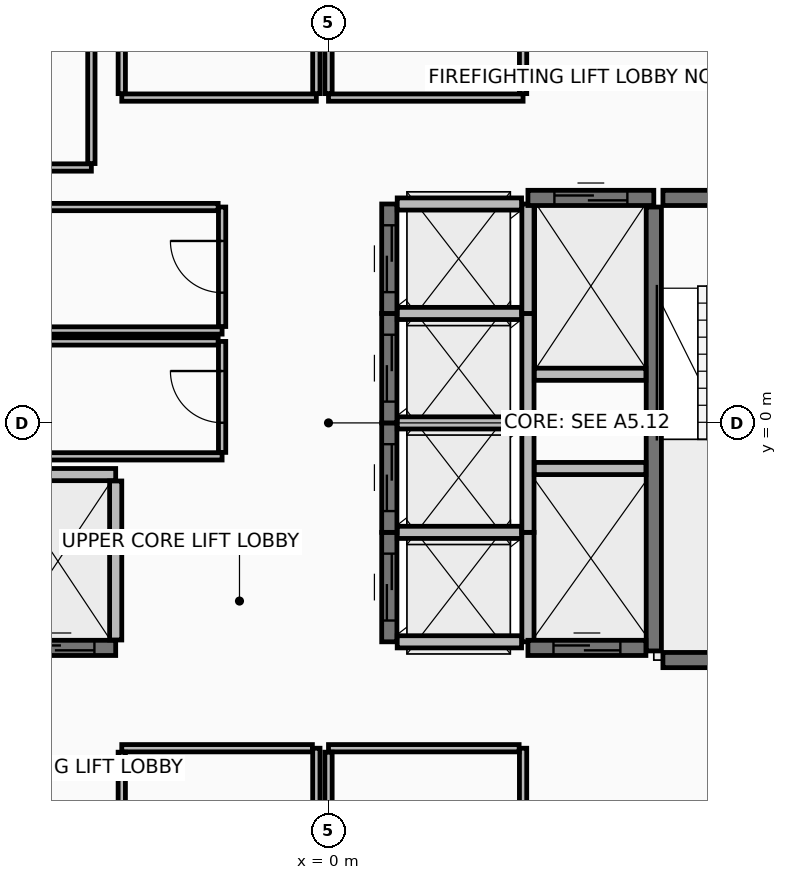
"""IFC4 building model, lengths in metres.
Left out: names, types, materials, properties, quantities, classifications, styles, units other than length and angle.
Written with IfcOpenShell. Run it as: python <this file> out.ifc"""

import sys

from ifc_helpers import new_model, si_unit, direction, frame, frame_2d, origin, place, context, subcontext, project, spatial, rectangle, extrude, element, fill, save


model = new_model("IFC4")
c1 = context("Model", 3, precision=1e-05, world=origin(), true_north=direction((0.0, 1.0)))
c2 = subcontext(c1, "Body", "Model", "MODEL_VIEW")
j1 = project(units=[si_unit("LENGTHUNIT", "METRE"), si_unit("PLANEANGLEUNIT", "RADIAN")], contexts=[c1])
p1 = place(None, origin())
s1 = spatial("IfcSite", under=j1, at=p1, CompositionType="ELEMENT")
p2 = place(p1, origin())
s2 = spatial("IfcBuilding", under=s1, at=p2, CompositionType="ELEMENT")
p3 = place(p2, frame((0.0, 0.0, 227.05)))
s3 = spatial("IfcBuildingStorey", under=s2, at=p3, CompositionType="ELEMENT", Elevation=227.05)
p4 = place(p3, frame((5.35, -3.75, 0.0), z_axis=(0.0, 0.0, 1.0), x_axis=(0.0, 1.0, 0.0)))
e1 = element("IfcWall", 1, at=p4, inside=s3, PredefinedType="SHEAR", context=c2, shape_type="SweptSolid", body=[
    extrude(rectangle(XDim=7.3, YDim=0.25, at=frame_2d((3.65, 0.0))), origin(), (0.0, 0.0, 1.0), 3.42),
])
p5 = place(p3, frame((5.5, 3.7, 0.0), z_axis=(0.0, 0.0, 1.0), x_axis=(1.0, 0.0, 0.0)))
e2 = element("IfcWall", 2, at=p5, inside=s3, PredefinedType="SHEAR", context=c2, shape_type="SweptSolid", body=[
    extrude(rectangle(XDim=3.0, YDim=0.25, at=frame_2d((1.5, 0.0))), origin(), (0.0, 0.0, 1.0), 3.42),
])
p6 = place(p5, frame((0.95, 0.0, 0.0)))
e3 = element("IfcOpeningElement", 3, at=p6, cuts=e2, PredefinedType="OPENING", context=c2, shape_type="SweptSolid", body=[
    extrude(rectangle(XDim=1.1, YDim=2.15, at=frame_2d((0.55, 1.075))), frame((0.0, 0.135, 0.0), z_axis=(0.0, -1.0, 0.0), x_axis=(1.0, 0.0, 0.0)), (0.0, 0.0, 1.0), 0.27),
])
p7 = place(p3, frame((5.5, -3.9, 0.0), z_axis=(0.0, 0.0, 1.0), x_axis=(1.0, 0.0, 0.0)))
e4 = element("IfcWall", 4, at=p7, inside=s3, PredefinedType="SHEAR", context=c2, shape_type="SweptSolid", body=[
    extrude(rectangle(XDim=3.0, YDim=0.25, at=frame_2d((1.5, 0.0))), origin(), (0.0, 0.0, 1.0), 3.42),
])
p8 = place(p3, frame((1.0, -3.6, 0.0), z_axis=(0.0, 0.0, 1.0), x_axis=(0.0, 1.0, 0.0)))
e5 = element("IfcWall", 5, at=p8, inside=s3, PredefinedType="SHEAR", context=c2, shape_type="SweptSolid", body=[
    extrude(rectangle(XDim=1.8, YDim=0.25, at=frame_2d((0.9, 0.0))), origin(), (0.0, 0.0, 1.0), 3.42),
])
p9 = place(p8, frame((0.35, 0.0, 0.0)))
e6 = element("IfcOpeningElement", 6, at=p9, cuts=e5, PredefinedType="OPENING", context=c2, shape_type="SweptSolid", body=[
    extrude(rectangle(XDim=1.1, YDim=2.2, at=frame_2d((0.55, 1.1))), frame((0.0, 0.135, 0.0), z_axis=(0.0, -1.0, 0.0), x_axis=(1.0, 0.0, 0.0)), (0.0, 0.0, 1.0), 0.27),
])
p10 = place(p3, frame((3.28, -3.6, 0.0), z_axis=(0.0, 0.0, 1.0), x_axis=(0.0, 1.0, 0.0)))
e7 = element("IfcWall", 7, at=p10, inside=s3, PredefinedType="PARTITIONING", context=c2, shape_type="SweptSolid", body=[
    extrude(rectangle(XDim=1.8, YDim=0.2, at=frame_2d((0.9, 0.0))), origin(), (0.0, 0.0, 1.0), 3.42),
])
for number, where, z_axis, x_axis in (
    (8, (1.13, -3.6, 0.0), (0.0, 0.0, 1.0), (1.0, 0.0, 0.0)),
    (9, (1.13, -1.8, 0.0), (0.0, 0.0, 1.0), (1.0, 0.0, 0.0)),
):
    element("IfcWall", number, at=place(p3, frame(where, z_axis=z_axis, x_axis=x_axis)), inside=s3, PredefinedType="PARTITIONING", context=c2, shape_type="SweptSolid", body=[
        extrude(rectangle(XDim=2.045, YDim=0.2, at=frame_2d((1.022, 0.0))), origin(), (0.0, 0.0, 1.0), 3.42),
    ])
p11 = place(p3, frame((1.0, -1.8, 0.0), z_axis=(0.0, 0.0, 1.0), x_axis=(0.0, 1.0, 0.0)))
e10 = element("IfcWall", 10, at=p11, inside=s3, PredefinedType="SHEAR", context=c2, shape_type="SweptSolid", body=[
    extrude(rectangle(XDim=1.8, YDim=0.25, at=frame_2d((0.9, 0.0))), origin(), (0.0, 0.0, 1.0), 3.42),
])
p12 = place(p11, frame((0.35, 0.0, 0.0)))
e11 = element("IfcOpeningElement", 11, at=p12, cuts=e10, PredefinedType="OPENING", context=c2, shape_type="SweptSolid", body=[
    extrude(rectangle(XDim=1.1, YDim=2.2, at=frame_2d((0.55, 1.1))), frame((0.0, 0.135, 0.0), z_axis=(0.0, -1.0, 0.0), x_axis=(1.0, 0.0, 0.0)), (0.0, 0.0, 1.0), 0.27),
])
p13 = place(p3, frame((3.28, -1.8, 0.0), z_axis=(0.0, 0.0, 1.0), x_axis=(0.0, 1.0, 0.0)))
e12 = element("IfcWall", 12, at=p13, inside=s3, PredefinedType="PARTITIONING", context=c2, shape_type="SweptSolid", body=[
    extrude(rectangle(XDim=1.8, YDim=0.2, at=frame_2d((0.9, 0.0))), origin(), (0.0, 0.0, 1.0), 3.42),
])
p14 = place(p3, frame((1.13, 0.0, 0.0), z_axis=(0.0, 0.0, 1.0), x_axis=(1.0, 0.0, 0.0)))
e13 = element("IfcWall", 13, at=p14, inside=s3, PredefinedType="PARTITIONING", context=c2, shape_type="SweptSolid", body=[
    extrude(rectangle(XDim=2.045, YDim=0.2, at=frame_2d((1.022, 0.0))), origin(), (0.0, 0.0, 1.0), 3.42),
])
p15 = place(p3, frame((1.0, 0.0, 0.0), z_axis=(0.0, 0.0, 1.0), x_axis=(0.0, 1.0, 0.0)))
e14 = element("IfcWall", 14, at=p15, inside=s3, PredefinedType="SHEAR", context=c2, shape_type="SweptSolid", body=[
    extrude(rectangle(XDim=1.8, YDim=0.25, at=frame_2d((0.9, 0.0))), origin(), (0.0, 0.0, 1.0), 3.42),
])
p16 = place(p15, frame((0.35, 0.0, 0.0)))
e15 = element("IfcOpeningElement", 15, at=p16, cuts=e14, PredefinedType="OPENING", context=c2, shape_type="SweptSolid", body=[
    extrude(rectangle(XDim=1.1, YDim=2.2, at=frame_2d((0.55, 1.1))), frame((0.0, 0.135, 0.0), z_axis=(0.0, -1.0, 0.0), x_axis=(1.0, 0.0, 0.0)), (0.0, 0.0, 1.0), 0.27),
])
p17 = place(p3, frame((3.28, 0.0, 0.0), z_axis=(0.0, 0.0, 1.0), x_axis=(0.0, 1.0, 0.0)))
e16 = element("IfcWall", 16, at=p17, inside=s3, PredefinedType="PARTITIONING", context=c2, shape_type="SweptSolid", body=[
    extrude(rectangle(XDim=1.8, YDim=0.2, at=frame_2d((0.9, 0.0))), origin(), (0.0, 0.0, 1.0), 3.42),
])
p18 = place(p3, frame((1.13, 1.8, 0.0), z_axis=(0.0, 0.0, 1.0), x_axis=(1.0, 0.0, 0.0)))
e17 = element("IfcWall", 17, at=p18, inside=s3, PredefinedType="PARTITIONING", context=c2, shape_type="SweptSolid", body=[
    extrude(rectangle(XDim=2.045, YDim=0.2, at=frame_2d((1.022, 0.0))), origin(), (0.0, 0.0, 1.0), 3.42),
])
p19 = place(p3, frame((1.0, 1.8, 0.0), z_axis=(0.0, 0.0, 1.0), x_axis=(0.0, 1.0, 0.0)))
e18 = element("IfcWall", 18, at=p19, inside=s3, PredefinedType="SHEAR", context=c2, shape_type="SweptSolid", body=[
    extrude(rectangle(XDim=1.8, YDim=0.25, at=frame_2d((0.9, 0.0))), origin(), (0.0, 0.0, 1.0), 3.42),
])
p20 = place(p19, frame((0.35, 0.0, 0.0)))
e19 = element("IfcOpeningElement", 19, at=p20, cuts=e18, PredefinedType="OPENING", context=c2, shape_type="SweptSolid", body=[
    extrude(rectangle(XDim=1.1, YDim=2.2, at=frame_2d((0.55, 1.1))), frame((0.0, 0.135, 0.0), z_axis=(0.0, -1.0, 0.0), x_axis=(1.0, 0.0, 0.0)), (0.0, 0.0, 1.0), 0.27),
])
p21 = place(p3, frame((3.28, 1.8, 0.0), z_axis=(0.0, 0.0, 1.0), x_axis=(0.0, 1.0, 0.0)))
e20 = element("IfcWall", 20, at=p21, inside=s3, PredefinedType="PARTITIONING", context=c2, shape_type="SweptSolid", body=[
    extrude(rectangle(XDim=1.8, YDim=0.2, at=frame_2d((0.9, 0.0))), origin(), (0.0, 0.0, 1.0), 3.42),
])
p22 = place(p3, frame((1.13, 3.6, 0.0), z_axis=(0.0, 0.0, 1.0), x_axis=(1.0, 0.0, 0.0)))
e21 = element("IfcWall", 21, at=p22, inside=s3, PredefinedType="PARTITIONING", context=c2, shape_type="SweptSolid", body=[
    extrude(rectangle(XDim=2.045, YDim=0.2, at=frame_2d((1.022, 0.0))), origin(), (0.0, 0.0, 1.0), 2.715),
])
p23 = place(p3, frame((-5.4, -3.7, 0.0), z_axis=(0.0, 0.0, 1.0), x_axis=(1.0, 0.0, 0.0)))
e22 = element("IfcWall", 22, at=p23, inside=s3, PredefinedType="SHEAR", context=c2, shape_type="SweptSolid", body=[
    extrude(rectangle(XDim=1.9, YDim=0.25, at=frame_2d((0.95, 0.0))), origin(), (0.0, 0.0, 1.0), 3.42),
])
p24 = place(p23, frame((0.35, 0.0, 0.0)))
e23 = element("IfcOpeningElement", 23, at=p24, cuts=e22, PredefinedType="OPENING", context=c2, shape_type="SweptSolid", body=[
    extrude(rectangle(XDim=1.2, YDim=2.2, at=frame_2d((0.6, 1.1))), frame((0.0, 0.135, 0.0), z_axis=(0.0, -1.0, 0.0), x_axis=(1.0, 0.0, 0.0)), (0.0, 0.0, 1.0), 0.27),
])
p25 = place(p3, frame((-5.27, -0.85, 0.0), z_axis=(0.0, 0.0, 1.0), x_axis=(1.0, 0.0, 0.0)))
e24 = element("IfcWall", 24, at=p25, inside=s3, PredefinedType="PARTITIONING", context=c2, shape_type="SweptSolid", body=[
    extrude(rectangle(XDim=1.77, YDim=0.2, at=frame_2d((0.885, 0.0))), origin(), (0.0, 0.0, 1.0), 3.42),
])
p26 = place(p3, frame((-3.5, -3.57, 0.0), z_axis=(0.0, 0.0, 1.0), x_axis=(0.0, 1.0, 0.0)))
e25 = element("IfcWall", 25, at=p26, inside=s3, PredefinedType="PARTITIONING", context=c2, shape_type="SweptSolid", body=[
    extrude(rectangle(XDim=2.615, YDim=0.2, at=frame_2d((1.308, 0.0))), origin(), (0.0, 0.0, 1.0), 3.42),
])
p27 = place(p3, frame((3.28, 3.7, 0.0), z_axis=(0.0, 0.0, 1.0), x_axis=(1.0, 0.0, 0.0)))
e26 = element("IfcWall", 26, at=p27, inside=s3, PredefinedType="SHEAR", context=c2, shape_type="SweptSolid", body=[
    extrude(rectangle(XDim=2.07, YDim=0.25, at=frame_2d((1.035, 0.0))), origin(), (0.0, 0.0, 1.0), 3.42),
])
p28 = place(p27, frame((0.435, 0.0, 0.0)))
e27 = element("IfcOpeningElement", 27, at=p28, cuts=e26, PredefinedType="OPENING", context=c2, shape_type="SweptSolid", body=[
    extrude(rectangle(XDim=1.2, YDim=2.2, at=frame_2d((0.6, 1.1))), frame((0.0, 0.135, 0.0), z_axis=(0.0, -1.0, 0.0), x_axis=(1.0, 0.0, 0.0)), (0.0, 0.0, 1.0), 0.27),
])
p29 = place(p3, frame((3.385, 0.8, 0.0), z_axis=(0.0, 0.0, 1.0), x_axis=(1.0, 0.0, 0.0)))
e28 = element("IfcWall", 28, at=p29, inside=s3, PredefinedType="PARTITIONING", context=c2, shape_type="SweptSolid", body=[
    extrude(rectangle(XDim=1.835, YDim=0.2, at=frame_2d((0.917, 0.0))), origin(), (0.0, 0.0, 1.0), 3.42),
])
p30 = place(p3, frame((3.28, -3.7, 0.0), z_axis=(0.0, 0.0, 1.0), x_axis=(1.0, 0.0, 0.0)))
e29 = element("IfcWall", 29, at=p30, inside=s3, PredefinedType="SHEAR", context=c2, shape_type="SweptSolid", body=[
    extrude(rectangle(XDim=1.94, YDim=0.25, at=frame_2d((0.97, 0.0))), origin(), (0.0, 0.0, 1.0), 3.42),
])
p31 = place(p30, frame((0.42, 0.0, 0.0)))
e30 = element("IfcOpeningElement", 30, at=p31, cuts=e29, PredefinedType="OPENING", context=c2, shape_type="SweptSolid", body=[
    extrude(rectangle(XDim=1.1, YDim=2.2, at=frame_2d((0.55, 1.1))), frame((0.0, 0.135, 0.0), z_axis=(0.0, -1.0, 0.0), x_axis=(1.0, 0.0, 0.0)), (0.0, 0.0, 1.0), 0.27),
])
p32 = place(p3, frame((3.385, -0.75, 0.0), z_axis=(0.0, 0.0, 1.0), x_axis=(1.0, 0.0, 0.0)))
e31 = element("IfcWall", 31, at=p32, inside=s3, PredefinedType="PARTITIONING", context=c2, shape_type="SweptSolid", body=[
    extrude(rectangle(XDim=1.835, YDim=0.2, at=frame_2d((0.917, 0.0))), origin(), (0.0, 0.0, 1.0), 3.42),
])
p33 = place(p3, frame((-5.22, 1.52, 0.0), z_axis=(0.0, 0.0, 1.0), x_axis=(1.0, 0.0, 0.0)))
e32 = element("IfcWall", 32, at=p33, inside=s3, PredefinedType="PARTITIONING", context=c2, shape_type="SweptSolid", body=[
    extrude(rectangle(XDim=3.47, YDim=0.12, at=frame_2d((1.735, 0.0))), origin(), (0.0, 0.0, 1.0), 3.42),
])
p34 = place(p3, frame((-1.75, 1.585, 0.0), z_axis=(0.0, 0.0, 1.0), x_axis=(0.0, 1.0, 0.0)))
e33 = element("IfcWall", 33, at=p34, inside=s3, PredefinedType="PARTITIONING", context=c2, shape_type="SweptSolid", body=[
    extrude(rectangle(XDim=1.965, YDim=0.12, at=frame_2d((0.982, 0.0))), origin(), (0.0, 0.0, 1.0), 3.42),
])
p35 = place(p34, frame((0.557, 0.0, 0.0)))
e34 = element("IfcOpeningElement", 34, at=p35, cuts=e33, PredefinedType="OPENING", context=c2, shape_type="SweptSolid", body=[
    extrude(rectangle(XDim=0.85, YDim=2.1, at=frame_2d((0.425, 1.05))), frame((0.0, 0.07, 0.0), z_axis=(0.0, -1.0, 0.0), x_axis=(1.0, 0.0, 0.0)), (0.0, 0.0, 1.0), 0.14),
])
p36 = place(p3, frame((-1.815, 3.55, 0.0), z_axis=(0.0, 0.0, 1.0), x_axis=(-1.0, 0.0, 0.0)))
e35 = element("IfcWall", 35, at=p36, inside=s3, PredefinedType="PARTITIONING", context=c2, shape_type="SweptSolid", body=[
    extrude(rectangle(XDim=3.405, YDim=0.12, at=frame_2d((1.703, 0.0))), origin(), (0.0, 0.0, 1.0), 3.42),
])
p37 = place(p3, frame((-5.22, -0.55, 0.0), z_axis=(0.0, 0.0, 1.0), x_axis=(1.0, 0.0, 0.0)))
e36 = element("IfcWall", 36, at=p37, inside=s3, PredefinedType="PARTITIONING", context=c2, shape_type="SweptSolid", body=[
    extrude(rectangle(XDim=3.47, YDim=0.12, at=frame_2d((1.735, 0.0))), origin(), (0.0, 0.0, 1.0), 3.42),
])
p38 = place(p3, frame((-1.75, -0.485, 0.0), z_axis=(0.0, 0.0, 1.0), x_axis=(0.0, 1.0, 0.0)))
e37 = element("IfcWall", 37, at=p38, inside=s3, PredefinedType="PARTITIONING", context=c2, shape_type="SweptSolid", body=[
    extrude(rectangle(XDim=1.825, YDim=0.12, at=frame_2d((0.913, 0.0))), origin(), (0.0, 0.0, 1.0), 3.42),
])
p39 = place(p38, frame((0.488, 0.0, 0.0)))
e38 = element("IfcOpeningElement", 38, at=p39, cuts=e37, PredefinedType="OPENING", context=c2, shape_type="SweptSolid", body=[
    extrude(rectangle(XDim=0.85, YDim=2.1, at=frame_2d((0.425, 1.05))), frame((0.0, 0.07, 0.0), z_axis=(0.0, -1.0, 0.0), x_axis=(1.0, 0.0, 0.0)), (0.0, 0.0, 1.0), 0.14),
])
p40 = place(p3, frame((-1.815, 1.34, 0.0), z_axis=(0.0, 0.0, 1.0), x_axis=(-1.0, 0.0, 0.0)))
e39 = element("IfcWall", 39, at=p40, inside=s3, PredefinedType="PARTITIONING", context=c2, shape_type="SweptSolid", body=[
    extrude(rectangle(XDim=3.405, YDim=0.12, at=frame_2d((1.703, 0.0))), origin(), (0.0, 0.0, 1.0), 3.42),
])
p41 = place(p3, frame((-0.2, -7.42, 0.0), z_axis=(0.0, 0.0, 1.0), x_axis=(0.0, 1.0, 0.0)))
e40 = element("IfcWall", 40, at=p41, inside=s3, PredefinedType="PARTITIONING", context=c2, shape_type="SweptSolid", body=[
    extrude(rectangle(XDim=2.07, YDim=0.12, at=frame_2d((1.035, 0.0))), origin(), (0.0, 0.0, 1.0), 2.715),
])
p42 = place(p3, frame((-0.265, -5.35, 0.0), z_axis=(0.0, 0.0, 1.0), x_axis=(-1.0, 0.0, 0.0)))
e41 = element("IfcWall", 41, at=p42, inside=s3, PredefinedType="PARTITIONING", context=c2, shape_type="SweptSolid", body=[
    extrude(rectangle(XDim=3.135, YDim=0.12, at=frame_2d((1.567, 0.0))), origin(), (0.0, 0.0, 1.0), 2.715),
])
p43 = place(p3, frame((-3.4, -5.415, 0.0), z_axis=(0.0, 0.0, 1.0), x_axis=(0.0, -1.0, 0.0)))
e42 = element("IfcWall", 42, at=p43, inside=s3, PredefinedType="PARTITIONING", context=c2, shape_type="SweptSolid", body=[
    extrude(rectangle(XDim=2.8, YDim=0.12, at=frame_2d((1.4, 0.0))), origin(), (0.0, 0.0, 1.0), 2.715),
])
p44 = place(p3, frame((3.2, -8.215, 0.0), z_axis=(0.0, 0.0, 1.0), x_axis=(0.0, 1.0, 0.0)))
e43 = element("IfcWall", 43, at=p44, inside=s3, PredefinedType="PARTITIONING", context=c2, shape_type="SweptSolid", body=[
    extrude(rectangle(XDim=2.865, YDim=0.12, at=frame_2d((1.433, 0.0))), origin(), (0.0, 0.0, 1.0), 2.715),
])
p45 = place(p3, frame((3.135, -5.35, 0.0), z_axis=(0.0, 0.0, 1.0), x_axis=(-1.0, 0.0, 0.0)))
e44 = element("IfcWall", 44, at=p45, inside=s3, PredefinedType="PARTITIONING", context=c2, shape_type="SweptSolid", body=[
    extrude(rectangle(XDim=3.135, YDim=0.12, at=frame_2d((1.567, 0.0))), origin(), (0.0, 0.0, 1.0), 3.42),
])
p46 = place(p3, frame((0.0, -5.415, 0.0), z_axis=(0.0, 0.0, 1.0), x_axis=(0.0, -1.0, 0.0)))
e45 = element("IfcWall", 45, at=p46, inside=s3, PredefinedType="PARTITIONING", context=c2, shape_type="SweptSolid", body=[
    extrude(rectangle(XDim=2.005, YDim=0.12, at=frame_2d((1.002, 0.0))), origin(), (0.0, 0.0, 1.0), 2.715),
])
p47 = place(p3, frame((-3.4, 5.35, 0.0), z_axis=(0.0, 0.0, 1.0), x_axis=(1.0, 0.0, 0.0)))
e46 = element("IfcWall", 46, at=p47, inside=s3, PredefinedType="PARTITIONING", context=c2, shape_type="SweptSolid", body=[
    extrude(rectangle(XDim=3.2, YDim=0.12, at=frame_2d((1.6, 0.0))), origin(), (0.0, 0.0, 1.0), 3.42),
])
p48 = place(p3, frame((-0.2, 5.415, 0.0), z_axis=(0.0, 0.0, 1.0), x_axis=(0.0, 1.0, 0.0)))
e47 = element("IfcWall", 47, at=p48, inside=s3, PredefinedType="PARTITIONING", context=c2, shape_type="SweptSolid", body=[
    extrude(rectangle(XDim=2.005, YDim=0.12, at=frame_2d((1.002, 0.0))), origin(), (0.0, 0.0, 1.0), 2.715),
])
p49 = place(p3, frame((-3.4, 8.215, 0.0), z_axis=(0.0, 0.0, 1.0), x_axis=(0.0, -1.0, 0.0)))
e48 = element("IfcWall", 48, at=p49, inside=s3, PredefinedType="PARTITIONING", context=c2, shape_type="SweptSolid", body=[
    extrude(rectangle(XDim=2.8, YDim=0.12, at=frame_2d((1.4, 0.0))), origin(), (0.0, 0.0, 1.0), 2.715),
])
p50 = place(p3, frame((0.0, 5.35, 0.0), z_axis=(0.0, 0.0, 1.0), x_axis=(1.0, 0.0, 0.0)))
e49 = element("IfcWall", 49, at=p50, inside=s3, PredefinedType="PARTITIONING", context=c2, shape_type="SweptSolid", body=[
    extrude(rectangle(XDim=3.2, YDim=0.12, at=frame_2d((1.6, 0.0))), origin(), (0.0, 0.0, 1.0), 2.715),
])
p51 = place(p3, frame((3.2, 5.415, 0.0), z_axis=(0.0, 0.0, 1.0), x_axis=(0.0, 1.0, 0.0)))
e50 = element("IfcWall", 50, at=p51, inside=s3, PredefinedType="PARTITIONING", context=c2, shape_type="SweptSolid", body=[
    extrude(rectangle(XDim=2.8, YDim=0.12, at=frame_2d((1.4, 0.0))), origin(), (0.0, 0.0, 1.0), 2.715),
])
p52 = place(p3, frame((0.0, 7.42, 0.0), z_axis=(0.0, 0.0, 1.0), x_axis=(0.0, -1.0, 0.0)))
e51 = element("IfcWall", 51, at=p52, inside=s3, PredefinedType="PARTITIONING", context=c2, shape_type="SweptSolid", body=[
    extrude(rectangle(XDim=2.005, YDim=0.12, at=frame_2d((1.002, 0.0))), origin(), (0.0, 0.0, 1.0), 2.715),
])
p53 = place(p3, frame((-7.8, 4.2, 0.0), z_axis=(0.0, 0.0, 1.0), x_axis=(1.0, 0.0, 0.0)))
e52 = element("IfcWall", 52, at=p53, inside=s3, PredefinedType="PARTITIONING", context=c2, shape_type="SweptSolid", body=[
    extrude(rectangle(XDim=3.9, YDim=0.12, at=frame_2d((1.95, 0.0))), origin(), (0.0, 0.0, 1.0), 3.42),
])
p54 = place(p3, frame((-3.9, 4.265, 0.0), z_axis=(0.0, 0.0, 1.0), x_axis=(0.0, 1.0, 0.0)))
e53 = element("IfcWall", 53, at=p54, inside=s3, PredefinedType="PARTITIONING", context=c2, shape_type="SweptSolid", body=[
    extrude(rectangle(XDim=3.95, YDim=0.12, at=frame_2d((1.975, 0.0))), origin(), (0.0, 0.0, 1.0), 2.715),
])
p55 = place(p9, origin())
e54 = element("IfcDoor", 54, at=p55, inside=s3, OperationType="SLIDING_TO_LEFT", PredefinedType="DOOR", context=c2, shape_type="SweptSolid", body=[
    extrude(rectangle(XDim=1.1, YDim=2.2, at=frame_2d((0.55, 1.1))), frame((0.0, 0.025, 0.0), z_axis=(0.0, -1.0, 0.0), x_axis=(1.0, 0.0, 0.0)), (0.0, 0.0, 1.0), 0.05),
])
fill(e6, e54)
p56 = place(p12, origin())
e55 = element("IfcDoor", 55, at=p56, inside=s3, OperationType="SLIDING_TO_LEFT", PredefinedType="DOOR", context=c2, shape_type="SweptSolid", body=[
    extrude(rectangle(XDim=1.1, YDim=2.2, at=frame_2d((0.55, 1.1))), frame((0.0, 0.025, 0.0), z_axis=(0.0, -1.0, 0.0), x_axis=(1.0, 0.0, 0.0)), (0.0, 0.0, 1.0), 0.05),
])
fill(e11, e55)
p57 = place(p16, origin())
e56 = element("IfcDoor", 56, at=p57, inside=s3, OperationType="SLIDING_TO_LEFT", PredefinedType="DOOR", context=c2, shape_type="SweptSolid", body=[
    extrude(rectangle(XDim=1.1, YDim=2.2, at=frame_2d((0.55, 1.1))), frame((0.0, 0.025, 0.0), z_axis=(0.0, -1.0, 0.0), x_axis=(1.0, 0.0, 0.0)), (0.0, 0.0, 1.0), 0.05),
])
fill(e15, e56)
p58 = place(p20, origin())
e57 = element("IfcDoor", 57, at=p58, inside=s3, OperationType="SLIDING_TO_LEFT", PredefinedType="DOOR", context=c2, shape_type="SweptSolid", body=[
    extrude(rectangle(XDim=1.1, YDim=2.2, at=frame_2d((0.55, 1.1))), frame((0.0, 0.025, 0.0), z_axis=(0.0, -1.0, 0.0), x_axis=(1.0, 0.0, 0.0)), (0.0, 0.0, 1.0), 0.05),
])
fill(e19, e57)
p59 = place(p24, origin())
e58 = element("IfcDoor", 58, at=p59, inside=s3, OperationType="SLIDING_TO_RIGHT", PredefinedType="DOOR", context=c2, shape_type="SweptSolid", body=[
    extrude(rectangle(XDim=1.2, YDim=2.2, at=frame_2d((0.6, 1.1))), frame((0.0, 0.025, 0.0), z_axis=(0.0, -1.0, 0.0), x_axis=(1.0, 0.0, 0.0)), (0.0, 0.0, 1.0), 0.05),
])
fill(e23, e58)
p60 = place(p28, origin())
e59 = element("IfcDoor", 59, at=p60, inside=s3, OperationType="SLIDING_TO_RIGHT", PredefinedType="DOOR", context=c2, shape_type="SweptSolid", body=[
    extrude(rectangle(XDim=1.2, YDim=2.2, at=frame_2d((0.6, 1.1))), frame((0.0, 0.025, 0.0), z_axis=(0.0, -1.0, 0.0), x_axis=(1.0, 0.0, 0.0)), (0.0, 0.0, 1.0), 0.05),
])
fill(e27, e59)
p61 = place(p31, origin())
e60 = element("IfcDoor", 60, at=p61, inside=s3, OperationType="SLIDING_TO_LEFT", PredefinedType="DOOR", context=c2, shape_type="SweptSolid", body=[
    extrude(rectangle(XDim=1.1, YDim=2.2, at=frame_2d((0.55, 1.1))), frame((0.0, 0.025, 0.0), z_axis=(0.0, -1.0, 0.0), x_axis=(1.0, 0.0, 0.0)), (0.0, 0.0, 1.0), 0.05),
])
fill(e30, e60)
p62 = place(p35, frame((0.85, 0.0, 0.0), z_axis=(0.0, 0.0, 1.0), x_axis=(-1.0, 0.0, 0.0)))
e61 = element("IfcDoor", 61, at=p62, inside=s3, OperationType="SINGLE_SWING_RIGHT", PredefinedType="DOOR", context=c2, shape_type="SweptSolid", body=[
    extrude(rectangle(XDim=0.85, YDim=2.1, at=frame_2d((0.425, 1.05))), frame((0.0, 0.025, 0.0), z_axis=(0.0, -1.0, 0.0), x_axis=(1.0, 0.0, 0.0)), (0.0, 0.0, 1.0), 0.05),
])
fill(e34, e61)
p63 = place(p39, frame((0.85, 0.0, 0.0), z_axis=(0.0, 0.0, 1.0), x_axis=(-1.0, 0.0, 0.0)))
e62 = element("IfcDoor", 62, at=p63, inside=s3, OperationType="SINGLE_SWING_RIGHT", PredefinedType="DOOR", context=c2, shape_type="SweptSolid", body=[
    extrude(rectangle(XDim=0.85, YDim=2.1, at=frame_2d((0.425, 1.05))), frame((0.0, 0.025, 0.0), z_axis=(0.0, -1.0, 0.0), x_axis=(1.0, 0.0, 0.0)), (0.0, 0.0, 1.0), 0.05),
])
fill(e38, e62)
save(model, sys.argv[1])
